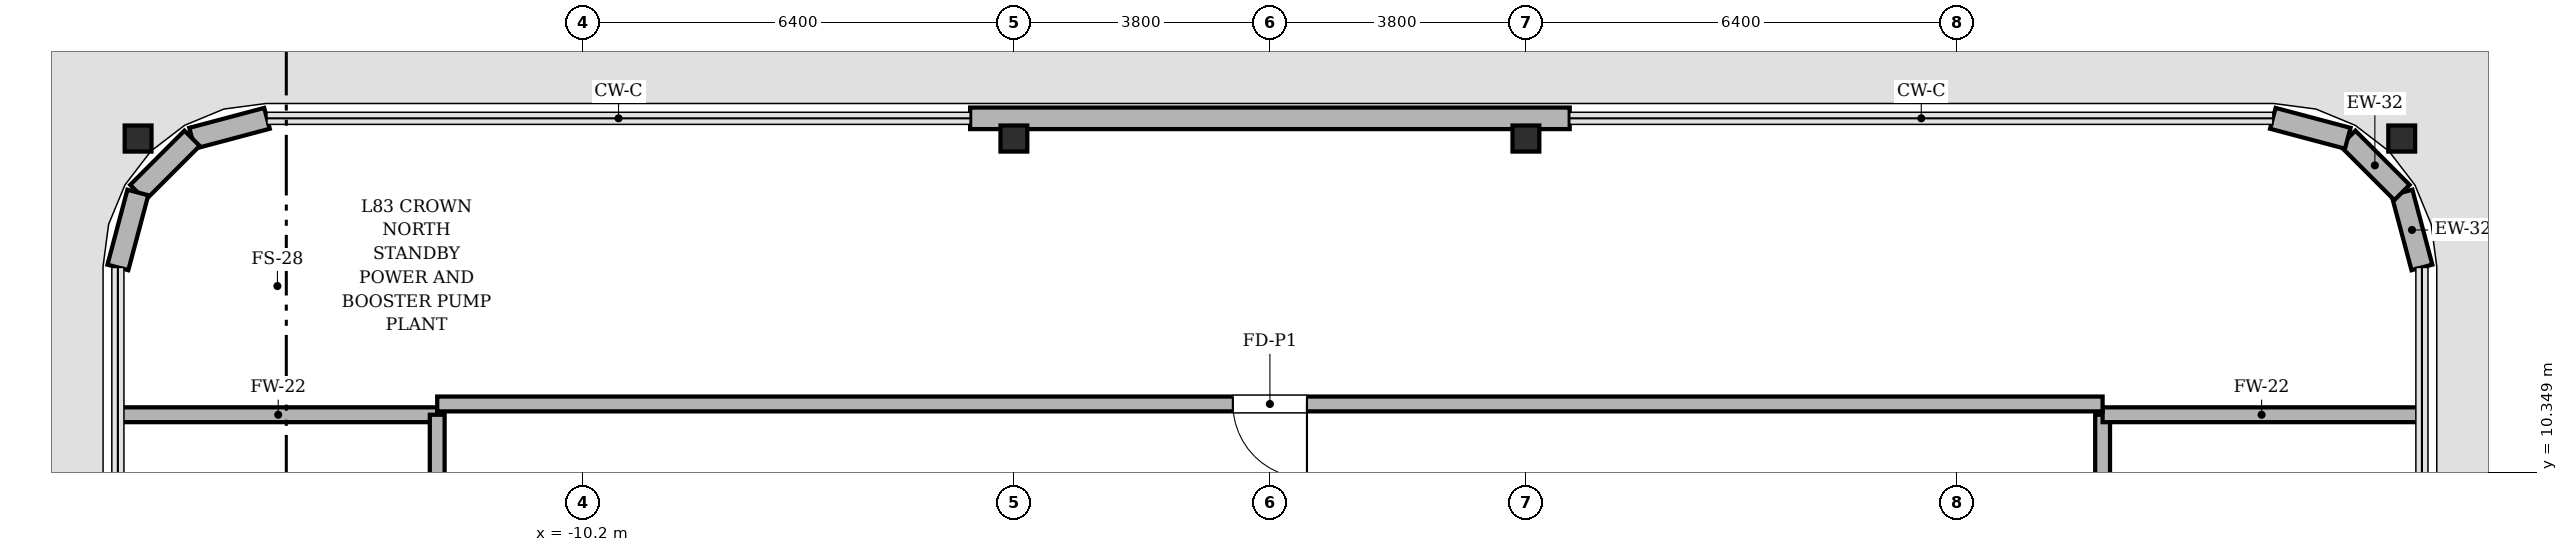
"""IFC4 building model, lengths in metres.
Left out: names, types, materials, properties, quantities, classifications, styles, units other than length and angle.
Written with IfcOpenShell. Run it as: python <this file> out.ifc"""

import sys

from ifc_helpers import new_model, si_unit, direction, frame, frame_2d, origin, origin_2d, place, context, subcontext, project, spatial, rectangle, i_section, extrude, element, fill, save


model = new_model("IFC4")
c1 = context("Model", 3, precision=1e-05, world=origin(), true_north=direction((0.0, 1.0)))
c2 = subcontext(c1, "Body", "Model", "MODEL_VIEW")
j1 = project(units=[si_unit("LENGTHUNIT", "METRE"), si_unit("PLANEANGLEUNIT", "RADIAN")], contexts=[c1])
p1 = place(None, origin())
s1 = spatial("IfcSite", under=j1, at=p1, CompositionType="ELEMENT")
p2 = place(p1, origin())
s2 = spatial("IfcBuilding", under=s1, at=p2, CompositionType="ELEMENT")
p3 = place(p2, frame((0.0, 0.0, 352.8)))
s3 = spatial("IfcBuildingStorey", under=s2, at=p3, CompositionType="ELEMENT", Elevation=352.8)
for number, where, z_axis, x_axis in (
    (1, (-3.8, 15.3, 0.0), (0.0, 0.0, 1.0), (1.0, 0.0, 0.0)),
    (2, (3.8, 15.3, 0.0), (0.0, 0.0, 1.0), (1.0, 0.0, 0.0)),
    (3, (16.8, 15.3, 0.0), (0.0, 0.0, 1.0), (1.0, 0.0, 0.0)),
    (4, (-16.8, 15.3, 0.0), (0.0, 0.0, 1.0), (1.0, 0.0, 0.0)),
):
    element("IfcColumn", number, at=place(p3, frame(where, z_axis=z_axis, x_axis=x_axis)), inside=s3, PredefinedType="COLUMN", context=c2, shape_type="SweptSolid", body=[
        extrude(i_section(OverallWidth=0.398, OverallDepth=0.387, WebThickness=0.021, FlangeThickness=0.033, FilletRadius=0.018, at=origin_2d()), origin(), (0.0, 0.0, 1.0), 4.498),
    ])
p4 = place(p3, frame((17.1, 13.387, 0.0), z_axis=(0.0, 0.0, 1.0), x_axis=(-0.257530614576, 0.966270139534, 0.0)))
e5 = element("IfcWall", 5, at=p4, inside=s3, PredefinedType="SOLIDWALL", context=c2, shape_type="SweptSolid", body=[
    extrude(rectangle(XDim=1.151, YDim=0.32, at=frame_2d((0.575, 0.0))), origin(), (0.0, 0.0, 1.0), 2.994),
])
p5 = place(p3, frame((16.804, 14.499, 0.0), z_axis=(0.0, 0.0, 1.0), x_axis=(-0.707106781187, 0.707106781187, 0.0)))
e6 = element("IfcWall", 6, at=p5, inside=s3, PredefinedType="SOLIDWALL", context=c2, shape_type="SweptSolid", body=[
    extrude(rectangle(XDim=1.138, YDim=0.32, at=frame_2d((0.569, 0.0))), origin(), (0.0, 0.0, 1.0), 2.994),
])
p6 = place(p3, frame((15.999, 15.304, 0.0), z_axis=(0.0, 0.0, 1.0), x_axis=(-0.966270139534, 0.257530614576, 0.0)))
e7 = element("IfcWall", 7, at=p6, inside=s3, PredefinedType="SOLIDWALL", context=c2, shape_type="SweptSolid", body=[
    extrude(rectangle(XDim=1.151, YDim=0.32, at=frame_2d((0.575, 0.0))), origin(), (0.0, 0.0, 1.0), 2.994),
])
p7 = place(p3, frame((4.45, 15.6, 0.0), z_axis=(0.0, 0.0, 1.0), x_axis=(-1.0, 0.0, 0.0)))
e8 = element("IfcWall", 8, at=p7, inside=s3, PredefinedType="SOLIDWALL", context=c2, shape_type="SweptSolid", body=[
    extrude(rectangle(XDim=8.9, YDim=0.32, at=frame_2d((4.45, 0.0))), origin(), (0.0, 0.0, 1.0), 2.994),
])
p8 = place(p3, frame((-14.887, 15.6, 0.0), z_axis=(0.0, 0.0, 1.0), x_axis=(-0.966270139534, -0.257530614576, 0.0)))
e9 = element("IfcWall", 9, at=p8, inside=s3, PredefinedType="SOLIDWALL", context=c2, shape_type="SweptSolid", body=[
    extrude(rectangle(XDim=1.151, YDim=0.32, at=frame_2d((0.575, 0.0))), origin(), (0.0, 0.0, 1.0), 2.994),
])
p9 = place(p3, frame((-15.999, 15.304, 0.0), z_axis=(0.0, 0.0, 1.0), x_axis=(-0.707106781187, -0.707106781187, 0.0)))
e10 = element("IfcWall", 10, at=p9, inside=s3, PredefinedType="SOLIDWALL", context=c2, shape_type="SweptSolid", body=[
    extrude(rectangle(XDim=1.138, YDim=0.32, at=frame_2d((0.569, 0.0))), origin(), (0.0, 0.0, 1.0), 2.994),
])
p10 = place(p3, frame((-16.804, 14.499, 0.0), z_axis=(0.0, 0.0, 1.0), x_axis=(-0.257530614576, -0.966270139534, 0.0)))
e11 = element("IfcWall", 11, at=p10, inside=s3, PredefinedType="SOLIDWALL", context=c2, shape_type="SweptSolid", body=[
    extrude(rectangle(XDim=1.151, YDim=0.32, at=frame_2d((0.575, 0.0))), origin(), (0.0, 0.0, 1.0), 2.994),
])
p11 = place(p3, frame((-17.08, 11.2, 0.0), z_axis=(0.0, 0.0, 1.0), x_axis=(1.0, 0.0, 0.0)))
e12 = element("IfcWall", 12, at=p11, inside=s3, PredefinedType="SOLIDWALL", context=c2, shape_type="SweptSolid", body=[
    extrude(rectangle(XDim=4.72, YDim=0.22, at=frame_2d((2.36, 0.0))), origin(), (0.0, 0.0, 1.0), 2.994),
])
p12 = place(p3, frame((-12.36, 11.2, 0.0), z_axis=(0.0, 0.0, 1.0), x_axis=(0.0, -1.0, 0.0)))
e13 = element("IfcWall", 13, at=p12, inside=s3, PredefinedType="SOLIDWALL", context=c2, shape_type="SweptSolid", body=[
    extrude(rectangle(XDim=22.4, YDim=0.22, at=frame_2d((11.2, 0.0))), origin(), (0.0, 0.0, 1.0), 2.994),
])
p13 = place(p12, frame((10.65, 0.0, 0.0)))
e14 = element("IfcOpeningElement", 14, at=p13, cuts=e13, PredefinedType="OPENING", context=c2, shape_type="SweptSolid", body=[
    extrude(rectangle(XDim=1.1, YDim=2.2, at=frame_2d((0.55, 1.1))), frame((0.0, 0.12, 0.0), z_axis=(0.0, -1.0, 0.0), x_axis=(1.0, 0.0, 0.0)), (0.0, 0.0, 1.0), 0.24),
])
p14 = place(p3, frame((12.36, -11.2, 0.0), z_axis=(0.0, 0.0, 1.0), x_axis=(0.0, 1.0, 0.0)))
e15 = element("IfcWall", 15, at=p14, inside=s3, PredefinedType="SOLIDWALL", context=c2, shape_type="SweptSolid", body=[
    extrude(rectangle(XDim=22.4, YDim=0.22, at=frame_2d((11.2, 0.0))), origin(), (0.0, 0.0, 1.0), 2.994),
])
p15 = place(p14, frame((10.65, 0.0, 0.0)))
e16 = element("IfcOpeningElement", 16, at=p15, cuts=e15, PredefinedType="OPENING", context=c2, shape_type="SweptSolid", body=[
    extrude(rectangle(XDim=1.1, YDim=2.2, at=frame_2d((0.55, 1.1))), frame((0.0, 0.12, 0.0), z_axis=(0.0, -1.0, 0.0), x_axis=(1.0, 0.0, 0.0)), (0.0, 0.0, 1.0), 0.24),
])
p16 = place(p3, frame((12.36, 11.2, 0.0), z_axis=(0.0, 0.0, 1.0), x_axis=(1.0, 0.0, 0.0)))
e17 = element("IfcWall", 17, at=p16, inside=s3, PredefinedType="SOLIDWALL", context=c2, shape_type="SweptSolid", body=[
    extrude(rectangle(XDim=4.72, YDim=0.22, at=frame_2d((2.36, 0.0))), origin(), (0.0, 0.0, 1.0), 2.994),
])
p17 = place(p3, frame((12.36, 11.36, 0.0), z_axis=(0.0, 0.0, 1.0), x_axis=(-1.0, 0.0, 0.0)))
e18 = element("IfcWall", 18, at=p17, inside=s3, PredefinedType="SOLIDWALL", context=c2, shape_type="SweptSolid", body=[
    extrude(rectangle(XDim=24.72, YDim=0.22, at=frame_2d((12.36, 0.0))), origin(), (0.0, 0.0, 1.0), 2.994),
])
p18 = place(p17, frame((11.81, 0.0, 0.0)))
e19 = element("IfcOpeningElement", 19, at=p18, cuts=e18, PredefinedType="OPENING", context=c2, shape_type="SweptSolid", body=[
    extrude(rectangle(XDim=1.1, YDim=2.2, at=frame_2d((0.55, 1.1))), frame((0.0, 0.12, 0.0), z_axis=(0.0, -1.0, 0.0), x_axis=(1.0, 0.0, 0.0)), (0.0, 0.0, 1.0), 0.24),
])
p19 = place(p18, origin())
e20 = element("IfcDoor", 20, at=p19, inside=s3, OperationType="SINGLE_SWING_LEFT", PredefinedType="DOOR", context=c2, shape_type="SweptSolid", body=[
    extrude(rectangle(XDim=1.1, YDim=2.2, at=frame_2d((0.55, 1.1))), frame((0.0, 0.025, 0.0), z_axis=(0.0, -1.0, 0.0), x_axis=(1.0, 0.0, 0.0)), (0.0, 0.0, 1.0), 0.05),
])
fill(e19, e20)
save(model, sys.argv[1])
